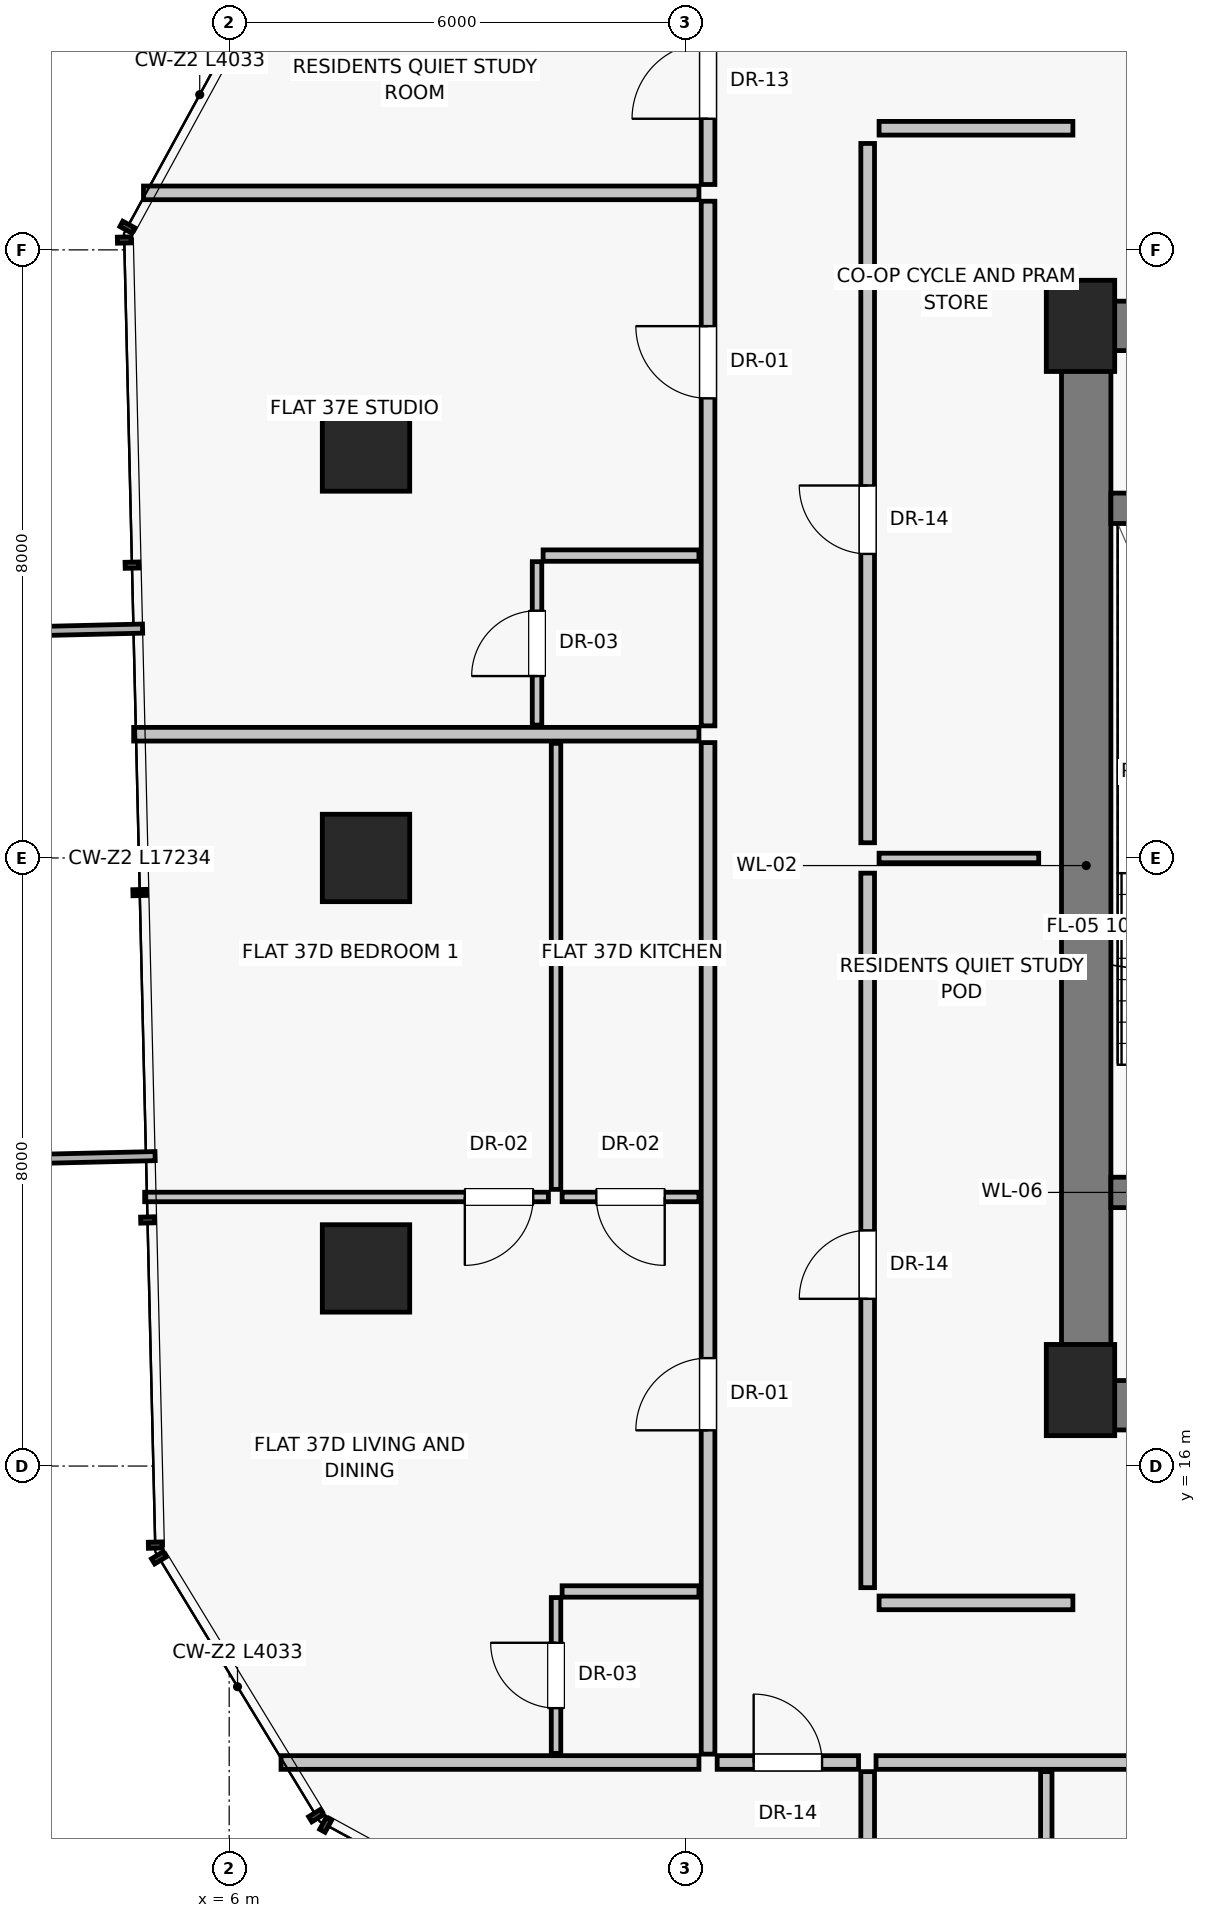
"""IFC4 building model, lengths in metres.
Left out: names, types, materials, properties, quantities, classifications, styles, units other than length and angle.
Written with IfcOpenShell. Run it as: python <this file> out.ifc"""

import sys

from ifc_helpers import new_model, si_unit, direction, frame, frame_2d, origin, origin_2d, place, context, subcontext, project, spatial, rectangle, extrude, source, transform, mapped, element, fill, save


model = new_model("IFC4")
c1 = context("Model", 3, precision=1e-05, world=origin(), true_north=direction((0.0, 1.0)))
c2 = subcontext(c1, "Body", "Model", "MODEL_VIEW")
j1 = project(units=[si_unit("LENGTHUNIT", "METRE"), si_unit("PLANEANGLEUNIT", "RADIAN")], contexts=[c1])
p1 = place(None, origin())
s1 = spatial("IfcSite", under=j1, at=p1, CompositionType="ELEMENT")
p2 = place(p1, origin())
s2 = spatial("IfcBuilding", under=s1, at=p2, CompositionType="ELEMENT")
p3 = place(p2, frame((0.0, 0.0, 132.75)))
s3 = spatial("IfcBuildingStorey", under=s2, at=p3, CompositionType="ELEMENT", Elevation=132.75)
for number, where, z_axis, x_axis in (
    (1, (17.2, 17.0, 0.0), (0.0, 0.0, 1.0), (1.0, 0.0, 0.0)),
    (2, (17.2, 31.0, 0.0), (0.0, 0.0, 1.0), (1.0, 0.0, 0.0)),
):
    element("IfcColumn", number, at=place(p3, frame(where, z_axis=z_axis, x_axis=x_axis)), inside=s3, PredefinedType="PILASTER", context=c2, shape_type="SweptSolid", body=[
        extrude(rectangle(XDim=0.9, YDim=1.2, at=origin_2d()), origin(), (0.0, 0.0, 1.0), 3.25),
    ])
for number, where, z_axis, x_axis in (
    (3, (7.8, 29.4, 0.0), (0.0, 0.0, 1.0), (1.0, 0.0, 0.0)),
    (4, (7.8, 24.0, 0.0), (0.0, 0.0, 1.0), (1.0, 0.0, 0.0)),
    (5, (7.8, 18.6, 0.0), (0.0, 0.0, 1.0), (1.0, 0.0, 0.0)),
):
    element("IfcColumn", number, at=place(p3, frame(where, z_axis=z_axis, x_axis=x_axis)), inside=s3, PredefinedType="COLUMN", context=c2, shape_type="SweptSolid", body=[
        extrude(rectangle(XDim=1.15, YDim=1.15, at=origin_2d()), origin(), (0.0, 0.0, 1.0), 3.25),
    ])
p4 = place(p3, frame((17.275, 16.8, 0.0), z_axis=(0.0, 0.0, 1.0), x_axis=(0.0, 1.0, 0.0)))
e6 = element("IfcWall", 6, at=p4, inside=s3, PredefinedType="SHEAR", context=c2, shape_type="SweptSolid", body=[
    extrude(rectangle(XDim=14.2, YDim=0.65, at=frame_2d((7.1, 0.0))), origin(), (0.0, 0.0, 1.0), 3.0),
])
p5 = place(p3, frame((17.2, 16.8, 0.0), z_axis=(0.0, 0.0, 1.0), x_axis=(1.0, 0.0, 0.0)))
e7 = element("IfcWall", 7, at=p5, inside=s3, PredefinedType="SHEAR", context=c2, shape_type="SweptSolid", body=[
    extrude(rectangle(XDim=5.85, YDim=0.65, at=frame_2d((2.925, 0.0))), origin(), (0.0, 0.0, 1.0), 3.0),
])
p6 = place(p5, frame((1.15, 0.0, 0.0)))
e8 = element("IfcOpeningElement", 8, at=p6, cuts=e7, PredefinedType="OPENING", context=c2, shape_type="SweptSolid", body=[
    extrude(rectangle(XDim=1.2, YDim=2.03, at=frame_2d((0.6, 1.015))), frame((0.0, 0.335, 0.0), z_axis=(0.0, -1.0, 0.0), x_axis=(1.0, 0.0, 0.0)), (0.0, 0.0, 1.0), 0.67),
])
p7 = place(p3, frame((17.2, 31.0, 0.0), z_axis=(0.0, 0.0, 1.0), x_axis=(1.0, 0.0, 0.0)))
e9 = element("IfcWall", 9, at=p7, inside=s3, PredefinedType="SHEAR", context=c2, shape_type="SweptSolid", body=[
    extrude(rectangle(XDim=3.8, YDim=0.65, at=frame_2d((1.9, 0.0))), origin(), (0.0, 0.0, 1.0), 3.0),
])
p8 = place(p7, frame((1.25, 0.0, 0.0)))
e10 = element("IfcOpeningElement", 10, at=p8, cuts=e9, PredefinedType="OPENING", context=c2, shape_type="SweptSolid", body=[
    extrude(rectangle(XDim=0.86, YDim=2.01, at=frame_2d((0.43, 1.005))), frame((0.0, 0.335, 0.0), z_axis=(0.0, -1.0, 0.0), x_axis=(1.0, 0.0, 0.0)), (0.0, 0.0, 1.0), 0.67),
])
p9 = place(p3, frame((17.6, 19.6, 0.0), z_axis=(0.0, 0.0, 1.0), x_axis=(1.0, 0.0, 0.0)))
e11 = element("IfcWall", 11, at=p9, inside=s3, PredefinedType="SHEAR", context=c2, shape_type="SweptSolid", body=[
    extrude(rectangle(XDim=3.4, YDim=0.4, at=frame_2d((1.7, 0.0))), origin(), (0.0, 0.0, 1.0), 3.0),
])
p10 = place(p9, frame((1.05, 0.0, 0.0)))
e12 = element("IfcOpeningElement", 12, at=p10, cuts=e11, PredefinedType="OPENING", context=c2, shape_type="SweptSolid", body=[
    extrude(rectangle(XDim=1.1, YDim=2.03, at=frame_2d((0.55, 1.015))), frame((0.0, 0.21, 0.0), z_axis=(0.0, -1.0, 0.0), x_axis=(1.0, 0.0, 0.0)), (0.0, 0.0, 1.0), 0.42),
])
p11 = place(p3, frame((17.6, 28.6, 0.0), z_axis=(0.0, 0.0, 1.0), x_axis=(1.0, 0.0, 0.0)))
e13 = element("IfcWall", 13, at=p11, inside=s3, PredefinedType="SHEAR", context=c2, shape_type="SweptSolid", body=[
    extrude(rectangle(XDim=3.4, YDim=0.4, at=frame_2d((1.7, 0.0))), origin(), (0.0, 0.0, 1.0), 3.0),
])
p12 = place(p3, frame((14.4, 14.4, 0.0), z_axis=(0.0, 0.0, 1.0), x_axis=(0.0, 1.0, 0.0)))
e14 = element("IfcWall", 14, at=p12, inside=s3, PredefinedType="PARTITIONING", context=c2, shape_type="SweptSolid", body=[
    extrude(rectangle(XDim=9.4, YDim=0.18, at=frame_2d((4.7, 0.0))), origin(), (0.0, 0.0, 1.0), 3.0),
])
p13 = place(p12, frame((3.8, 0.0, 0.0)))
e15 = element("IfcOpeningElement", 15, at=p13, cuts=e14, PredefinedType="OPENING", context=c2, shape_type="SweptSolid", body=[
    extrude(rectangle(XDim=0.9, YDim=2.01, at=frame_2d((0.45, 1.005))), frame((0.0, 0.1, 0.0), z_axis=(0.0, -1.0, 0.0), x_axis=(1.0, 0.0, 0.0)), (0.0, 0.0, 1.0), 0.2),
])
p14 = place(p3, frame((14.4, 24.2, 0.0), z_axis=(0.0, 0.0, 1.0), x_axis=(0.0, 1.0, 0.0)))
e16 = element("IfcWall", 16, at=p14, inside=s3, PredefinedType="PARTITIONING", context=c2, shape_type="SweptSolid", body=[
    extrude(rectangle(XDim=9.2, YDim=0.18, at=frame_2d((4.6, 0.0))), origin(), (0.0, 0.0, 1.0), 3.0),
])
p15 = place(p14, frame((3.8, 0.0, 0.0)))
e17 = element("IfcOpeningElement", 17, at=p15, cuts=e16, PredefinedType="OPENING", context=c2, shape_type="SweptSolid", body=[
    extrude(rectangle(XDim=0.9, YDim=2.01, at=frame_2d((0.45, 1.005))), frame((0.0, 0.1, 0.0), z_axis=(0.0, -1.0, 0.0), x_axis=(1.0, 0.0, 0.0)), (0.0, 0.0, 1.0), 0.2),
])
p16 = place(p3, frame((14.55, 24.0, 0.0), z_axis=(0.0, 0.0, 1.0), x_axis=(1.0, 0.0, 0.0)))
e18 = element("IfcWall", 18, at=p16, inside=s3, PredefinedType="PARTITIONING", context=c2, shape_type="SweptSolid", body=[
    extrude(rectangle(XDim=2.1, YDim=0.125, at=frame_2d((1.05, 0.0))), origin(), (0.0, 0.0, 1.0), 3.0),
])
for number, where, z_axis, x_axis in (
    (19, (14.55, 14.2, 0.0), (0.0, 0.0, 1.0), (1.0, 0.0, 0.0)),
    (20, (14.55, 33.6, 0.0), (0.0, 0.0, 1.0), (1.0, 0.0, 0.0)),
):
    element("IfcWall", number, at=place(p3, frame(where, z_axis=z_axis, x_axis=x_axis)), inside=s3, PredefinedType="PARTITIONING", context=c2, shape_type="SweptSolid", body=[
        extrude(rectangle(XDim=2.55, YDim=0.18, at=frame_2d((1.275, 0.0))), origin(), (0.0, 0.0, 1.0), 3.0),
    ])
p17 = place(p3, frame((14.4, 11.98, 0.0), z_axis=(0.0, 0.0, 1.0), x_axis=(0.0, -1.0, 0.0)))
e21 = element("IfcWall", 21, at=p17, inside=s3, PredefinedType="PARTITIONING", context=c2, shape_type="SweptSolid", body=[
    extrude(rectangle(XDim=4.628, YDim=0.18, at=frame_2d((2.314, 0.0))), origin(), (0.0, 0.0, 1.0), 3.0),
])
p18 = place(p3, frame((14.51, 12.1, 0.0), z_axis=(0.0, 0.0, 1.0), x_axis=(1.0, 0.0, 0.0)))
e22 = element("IfcWall", 22, at=p18, inside=s3, PredefinedType="PARTITIONING", context=c2, shape_type="SweptSolid", body=[
    extrude(rectangle(XDim=5.996, YDim=0.18, at=frame_2d((2.998, 0.0))), origin(), (0.0, 0.0, 1.0), 2.58),
])
p19 = place(p18, frame((3.638, 0.0, 0.0)))
e23 = element("IfcOpeningElement", 23, at=p19, cuts=e22, PredefinedType="OPENING", context=c2, shape_type="SweptSolid", body=[
    extrude(rectangle(XDim=0.95, YDim=2.02, at=frame_2d((0.475, 1.01))), frame((0.0, 0.1, 0.0), z_axis=(0.0, -1.0, 0.0), x_axis=(1.0, 0.0, 0.0)), (0.0, 0.0, 1.0), 0.2),
])
p20 = place(p3, frame((16.75, 11.98, 0.0), z_axis=(0.0, 0.0, 1.0), x_axis=(0.0, -1.0, 0.0)))
e24 = element("IfcWall", 24, at=p20, inside=s3, PredefinedType="PARTITIONING", context=c2, shape_type="SweptSolid", body=[
    extrude(rectangle(XDim=2.05, YDim=0.15, at=frame_2d((1.025, 0.0))), origin(), (0.0, 0.0, 1.0), 3.0),
])
p21 = place(p3, frame((12.18, 12.1, 0.0), z_axis=(0.0, 0.0, 1.0), x_axis=(-1.0, 0.0, 0.0)))
e25 = element("IfcWall", 25, at=p21, inside=s3, PredefinedType="PARTITIONING", context=c2, shape_type="SweptSolid", body=[
    extrude(rectangle(XDim=5.498, YDim=0.18, at=frame_2d((2.749, 0.0))), origin(), (0.0, 0.0, 1.0), 3.0),
])
p22 = place(p3, frame((12.3, 12.21, 0.0), z_axis=(0.0, 0.0, 1.0), x_axis=(0.0, 1.0, 0.0)))
e26 = element("IfcWall", 26, at=p22, inside=s3, PredefinedType="PARTITIONING", context=c2, shape_type="SweptSolid", body=[
    extrude(rectangle(XDim=13.308, YDim=0.18, at=frame_2d((6.654, 0.0))), origin(), (0.0, 0.0, 1.0), 2.58),
])
p23 = place(p22, frame((4.26, 0.0, 0.0)))
e27 = element("IfcOpeningElement", 27, at=p23, cuts=e26, PredefinedType="OPENING", context=c2, shape_type="SweptSolid", body=[
    extrude(rectangle(XDim=0.95, YDim=2.02, at=frame_2d((0.475, 1.01))), frame((0.0, 0.1, 0.0), z_axis=(0.0, -1.0, 0.0), x_axis=(1.0, 0.0, 0.0)), (0.0, 0.0, 1.0), 0.2),
])
p24 = place(p3, frame((12.18, 14.35, 0.0), z_axis=(0.0, 0.0, 1.0), x_axis=(-1.0, 0.0, 0.0)))
e28 = element("IfcWall", 28, at=p24, inside=s3, PredefinedType="PARTITIONING", context=c2, shape_type="SweptSolid", body=[
    extrude(rectangle(XDim=1.8, YDim=0.15, at=frame_2d((0.9, 0.0))), origin(), (0.0, 0.0, 1.0), 3.0),
])
p25 = place(p3, frame((10.3, 12.22, 0.0), z_axis=(0.0, 0.0, 1.0), x_axis=(0.0, 1.0, 0.0)))
e29 = element("IfcWall", 29, at=p25, inside=s3, PredefinedType="PARTITIONING", context=c2, shape_type="SweptSolid", body=[
    extrude(rectangle(XDim=2.05, YDim=0.125, at=frame_2d((1.025, 0.0))), origin(), (0.0, 0.0, 1.0), 3.0),
])
p26 = place(p25, frame((0.595, 0.0, 0.0)))
e30 = element("IfcOpeningElement", 30, at=p26, cuts=e29, PredefinedType="OPENING", context=c2, shape_type="SweptSolid", body=[
    extrude(rectangle(XDim=0.86, YDim=2.01, at=frame_2d((0.43, 1.005))), frame((0.0, 0.073, 0.0), z_axis=(0.0, -1.0, 0.0), x_axis=(1.0, 0.0, 0.0)), (0.0, 0.0, 1.0), 0.145),
])
p27 = place(p3, frame((12.18, 19.54, 0.0), z_axis=(0.0, 0.0, 1.0), x_axis=(-1.0, 0.0, 0.0)))
e31 = element("IfcWall", 31, at=p27, inside=s3, PredefinedType="PARTITIONING", context=c2, shape_type="SweptSolid", body=[
    extrude(rectangle(XDim=1.8, YDim=0.125, at=frame_2d((0.9, 0.0))), origin(), (0.0, 0.0, 1.0), 3.0),
])
p28 = place(p27, frame((0.45, 0.0, 0.0)))
e32 = element("IfcOpeningElement", 32, at=p28, cuts=e31, PredefinedType="OPENING", context=c2, shape_type="SweptSolid", body=[
    extrude(rectangle(XDim=0.9, YDim=2.01, at=frame_2d((0.45, 1.005))), frame((0.0, 0.073, 0.0), z_axis=(0.0, -1.0, 0.0), x_axis=(1.0, 0.0, 0.0)), (0.0, 0.0, 1.0), 0.145),
])
p29 = place(p3, frame((10.3, 19.64, 0.0), z_axis=(0.0, 0.0, 1.0), x_axis=(0.0, 1.0, 0.0)))
e33 = element("IfcWall", 33, at=p29, inside=s3, PredefinedType="PARTITIONING", context=c2, shape_type="SweptSolid", body=[
    extrude(rectangle(XDim=5.868, YDim=0.125, at=frame_2d((2.934, 0.0))), origin(), (0.0, 0.0, 1.0), 3.0),
])
p30 = place(p3, frame((10.2, 19.54, 0.0), z_axis=(0.0, 0.0, 1.0), x_axis=(-1.0, 0.0, 0.0)))
e34 = element("IfcWall", 34, at=p30, inside=s3, PredefinedType="PARTITIONING", context=c2, shape_type="SweptSolid", body=[
    extrude(rectangle(XDim=5.312, YDim=0.125, at=frame_2d((2.656, 0.0))), origin(), (0.0, 0.0, 1.0), 3.0),
])
p31 = place(p30, frame((0.2, 0.0, 0.0)))
e35 = element("IfcOpeningElement", 35, at=p31, cuts=e34, PredefinedType="OPENING", context=c2, shape_type="SweptSolid", body=[
    extrude(rectangle(XDim=0.9, YDim=2.01, at=frame_2d((0.45, 1.005))), frame((0.0, 0.073, 0.0), z_axis=(0.0, -1.0, 0.0), x_axis=(1.0, 0.0, 0.0)), (0.0, 0.0, 1.0), 0.145),
])
p32 = place(p3, frame((12.18, 25.628, 0.0), z_axis=(0.0, 0.0, 1.0), x_axis=(-1.0, 0.0, 0.0)))
e36 = element("IfcWall", 36, at=p32, inside=s3, PredefinedType="PARTITIONING", context=c2, shape_type="SweptSolid", body=[
    extrude(rectangle(XDim=7.437, YDim=0.18, at=frame_2d((3.718, 0.0))), origin(), (0.0, 0.0, 1.0), 3.0),
])
p33 = place(p3, frame((12.3, 32.86, 0.0), z_axis=(0.0, 0.0, 1.0), x_axis=(0.0, 1.0, 0.0)))
e37 = element("IfcWall", 37, at=p33, inside=s3, PredefinedType="PARTITIONING", context=c2, shape_type="SweptSolid", body=[
    extrude(rectangle(XDim=2.73, YDim=0.18, at=frame_2d((1.365, 0.0))), origin(), (0.0, 0.0, 1.0), 3.0),
])
p34 = place(p33, frame((0.865, 0.0, 0.0)))
e38 = element("IfcOpeningElement", 38, at=p34, cuts=e37, PredefinedType="OPENING", context=c2, shape_type="SweptSolid", body=[
    extrude(rectangle(XDim=1.0, YDim=2.01, at=frame_2d((0.5, 1.005))), frame((0.0, 0.1, 0.0), z_axis=(0.0, -1.0, 0.0), x_axis=(1.0, 0.0, 0.0)), (0.0, 0.0, 1.0), 0.2),
])
p35 = place(p3, frame((12.18, 32.75, 0.0), z_axis=(0.0, 0.0, 1.0), x_axis=(-1.0, 0.0, 0.0)))
e39 = element("IfcWall", 39, at=p35, inside=s3, PredefinedType="PARTITIONING", context=c2, shape_type="SweptSolid", body=[
    extrude(rectangle(XDim=7.307, YDim=0.18, at=frame_2d((3.654, 0.0))), origin(), (0.0, 0.0, 1.0), 3.0),
])
p36 = place(p3, frame((12.3, 25.738, 0.0), z_axis=(0.0, 0.0, 1.0), x_axis=(0.0, 1.0, 0.0)))
e40 = element("IfcWall", 40, at=p36, inside=s3, PredefinedType="PARTITIONING", context=c2, shape_type="SweptSolid", body=[
    extrude(rectangle(XDim=6.902, YDim=0.18, at=frame_2d((3.451, 0.0))), origin(), (0.0, 0.0, 1.0), 2.58),
])
p37 = place(p36, frame((4.309, 0.0, 0.0)))
e41 = element("IfcOpeningElement", 41, at=p37, cuts=e40, PredefinedType="OPENING", context=c2, shape_type="SweptSolid", body=[
    extrude(rectangle(XDim=0.95, YDim=2.02, at=frame_2d((0.475, 1.01))), frame((0.0, 0.1, 0.0), z_axis=(0.0, -1.0, 0.0), x_axis=(1.0, 0.0, 0.0)), (0.0, 0.0, 1.0), 0.2),
])
p38 = place(p3, frame((12.18, 27.978, 0.0), z_axis=(0.0, 0.0, 1.0), x_axis=(-1.0, 0.0, 0.0)))
e42 = element("IfcWall", 42, at=p38, inside=s3, PredefinedType="PARTITIONING", context=c2, shape_type="SweptSolid", body=[
    extrude(rectangle(XDim=2.05, YDim=0.15, at=frame_2d((1.025, 0.0))), origin(), (0.0, 0.0, 1.0), 3.0),
])
p39 = place(p3, frame((10.05, 25.748, 0.0), z_axis=(0.0, 0.0, 1.0), x_axis=(0.0, 1.0, 0.0)))
e43 = element("IfcWall", 43, at=p39, inside=s3, PredefinedType="PARTITIONING", context=c2, shape_type="SweptSolid", body=[
    extrude(rectangle(XDim=2.15, YDim=0.125, at=frame_2d((1.075, 0.0))), origin(), (0.0, 0.0, 1.0), 3.0),
])
p40 = place(p39, frame((0.645, 0.0, 0.0)))
e44 = element("IfcOpeningElement", 44, at=p40, cuts=e43, PredefinedType="OPENING", context=c2, shape_type="SweptSolid", body=[
    extrude(rectangle(XDim=0.86, YDim=2.01, at=frame_2d((0.43, 1.005))), frame((0.0, 0.073, 0.0), z_axis=(0.0, -1.0, 0.0), x_axis=(1.0, 0.0, 0.0)), (0.0, 0.0, 1.0), 0.145),
])
p41 = place(p3, frame((12.42, 12.1, 0.0), z_axis=(0.0, 0.0, 1.0), x_axis=(1.0, 0.0, 0.0)))
e45 = element("IfcWall", 45, at=p41, inside=s3, PredefinedType="PARTITIONING", context=c2, shape_type="SweptSolid", body=[
    extrude(rectangle(XDim=1.86, YDim=0.18, at=frame_2d((0.93, 0.0))), origin(), (0.0, 0.0, 1.0), 3.0),
])
p42 = place(p41, frame((0.48, 0.0, 0.0)))
e46 = element("IfcOpeningElement", 46, at=p42, cuts=e45, PredefinedType="OPENING", context=c2, shape_type="SweptSolid", body=[
    extrude(rectangle(XDim=0.9, YDim=2.01, at=frame_2d((0.45, 1.005))), frame((0.0, 0.1, 0.0), z_axis=(0.0, -1.0, 0.0), x_axis=(1.0, 0.0, 0.0)), (0.0, 0.0, 1.0), 0.2),
])
m1 = source(origin(), c2, "Body", "SweptSolid", [
    extrude(rectangle(XDim=0.9, YDim=2.01, at=frame_2d((0.45, 1.005))), frame((0.0, 0.025, 0.0), z_axis=(0.0, -1.0, 0.0), x_axis=(1.0, 0.0, 0.0)), (0.0, 0.0, 1.0), 0.05),
])
p43 = place(p13, origin())
e47 = element("IfcDoor", 47, at=p43, inside=s3, OperationType="SINGLE_SWING_LEFT", PredefinedType="DOOR", context=c2, shape_type="MappedRepresentation", body=[
    mapped(m1, transform((0.0, 0.0, 0.0), scale=1.0)),
])
fill(e15, e47)
p44 = place(p15, origin())
e48 = element("IfcDoor", 48, at=p44, inside=s3, OperationType="SINGLE_SWING_RIGHT", PredefinedType="DOOR", context=c2, shape_type="MappedRepresentation", body=[
    mapped(m1, transform((0.0, 0.0, 0.0), scale=1.0)),
])
fill(e17, e48)
m2 = source(origin(), c2, "Body", "SweptSolid", [
    extrude(rectangle(XDim=0.95, YDim=2.02, at=frame_2d((0.475, 1.01))), frame((0.0, 0.025, 0.0), z_axis=(0.0, -1.0, 0.0), x_axis=(1.0, 0.0, 0.0)), (0.0, 0.0, 1.0), 0.05),
])
p45 = place(p23, origin())
e49 = element("IfcDoor", 49, at=p45, inside=s3, OperationType="SINGLE_SWING_LEFT", PredefinedType="DOOR", context=c2, shape_type="MappedRepresentation", body=[
    mapped(m2, transform((0.0, 0.0, 0.0), scale=1.0)),
])
fill(e27, e49)
m3 = source(origin(), c2, "Body", "SweptSolid", [
    extrude(rectangle(XDim=0.86, YDim=2.01, at=frame_2d((0.43, 1.005))), frame((0.0, 0.025, 0.0), z_axis=(0.0, -1.0, 0.0), x_axis=(1.0, 0.0, 0.0)), (0.0, 0.0, 1.0), 0.05),
])
p46 = place(p26, origin())
e50 = element("IfcDoor", 50, at=p46, inside=s3, OperationType="SINGLE_SWING_RIGHT", PredefinedType="DOOR", context=c2, shape_type="MappedRepresentation", body=[
    mapped(m3, transform((0.0, 0.0, 0.0), scale=1.0)),
])
fill(e30, e50)
p47 = place(p28, origin())
e51 = element("IfcDoor", 51, at=p47, inside=s3, OperationType="SINGLE_SWING_LEFT", PredefinedType="DOOR", context=c2, shape_type="MappedRepresentation", body=[
    mapped(m1, transform((0.0, 0.0, 0.0), scale=1.0)),
])
fill(e32, e51)
p48 = place(p31, origin())
e52 = element("IfcDoor", 52, at=p48, inside=s3, OperationType="SINGLE_SWING_RIGHT", PredefinedType="DOOR", context=c2, shape_type="MappedRepresentation", body=[
    mapped(m1, transform((0.0, 0.0, 0.0), scale=1.0)),
])
fill(e35, e52)
m4 = source(origin(), c2, "Body", "SweptSolid", [
    extrude(rectangle(XDim=1.0, YDim=2.01, at=frame_2d((0.5, 1.005))), frame((0.0, 0.025, 0.0), z_axis=(0.0, -1.0, 0.0), x_axis=(1.0, 0.0, 0.0)), (0.0, 0.0, 1.0), 0.05),
])
p49 = place(p34, origin())
e53 = element("IfcDoor", 53, at=p49, inside=s3, OperationType="SINGLE_SWING_LEFT", PredefinedType="DOOR", context=c2, shape_type="MappedRepresentation", body=[
    mapped(m4, transform((0.0, 0.0, 0.0), scale=1.0)),
])
fill(e38, e53)
p50 = place(p37, origin())
e54 = element("IfcDoor", 54, at=p50, inside=s3, OperationType="SINGLE_SWING_RIGHT", PredefinedType="DOOR", context=c2, shape_type="MappedRepresentation", body=[
    mapped(m2, transform((0.0, 0.0, 0.0), scale=1.0)),
])
fill(e41, e54)
p51 = place(p40, origin())
e55 = element("IfcDoor", 55, at=p51, inside=s3, OperationType="SINGLE_SWING_LEFT", PredefinedType="DOOR", context=c2, shape_type="MappedRepresentation", body=[
    mapped(m3, transform((0.0, 0.0, 0.0), scale=1.0)),
])
fill(e44, e55)
p52 = place(p42, origin())
e56 = element("IfcDoor", 56, at=p52, inside=s3, OperationType="SINGLE_SWING_LEFT", PredefinedType="DOOR", context=c2, shape_type="MappedRepresentation", body=[
    mapped(m1, transform((0.0, 0.0, 0.0), scale=1.0)),
])
fill(e46, e56)
save(model, sys.argv[1])
